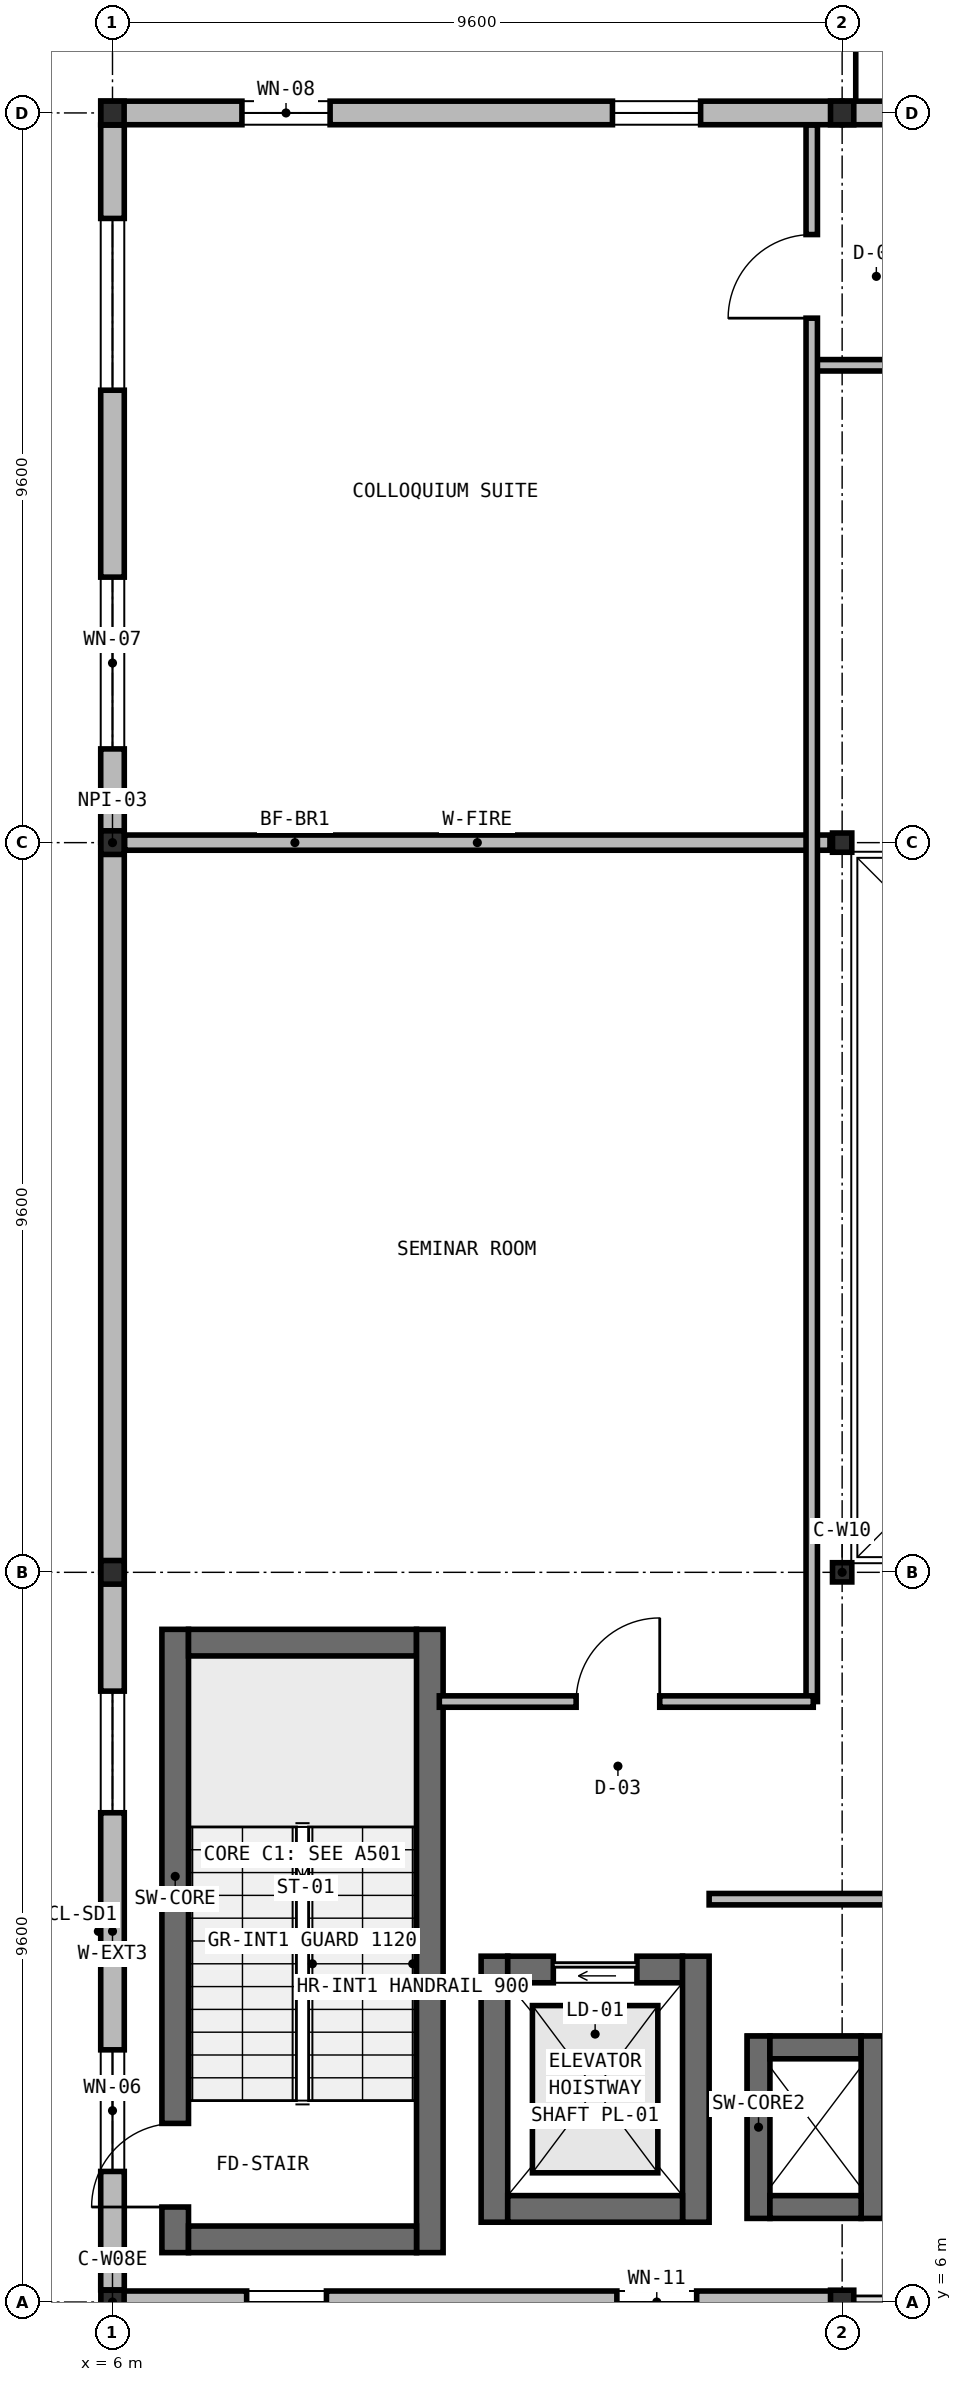
"""IFC4 building model, lengths in metres.
Left out: names, types, materials, properties, quantities, classifications, styles, units other than length and angle.
Written with IfcOpenShell. Run it as: python <this file> out.ifc"""

import sys

from ifc_helpers import new_model, si_unit, direction, frame, frame_2d, origin, origin_2d, place, context, subcontext, project, spatial, rectangle, i_section, extrude, element, fill, save


model = new_model("IFC4")
c1 = context("Model", 3, precision=1e-05, world=origin(), true_north=direction((0.0, 1.0)))
c2 = subcontext(c1, "Body", "Model", "MODEL_VIEW")
j1 = project(units=[si_unit("LENGTHUNIT", "METRE"), si_unit("PLANEANGLEUNIT", "RADIAN")], contexts=[c1])
p1 = place(None, origin())
s1 = spatial("IfcSite", under=j1, at=p1, CompositionType="ELEMENT")
p2 = place(p1, origin())
s2 = spatial("IfcBuilding", under=s1, at=p2, CompositionType="ELEMENT")
p3 = place(p2, frame((0.0, 0.0, 5.25)))
s3 = spatial("IfcBuildingStorey", under=s2, at=p3, CompositionType="ELEMENT", Elevation=5.25)
p4 = place(p3, frame((6.825, 6.65, 0.0), z_axis=(0.0, 0.0, 1.0), x_axis=(0.0, 1.0, 0.0)))
e1 = element("IfcWall", 1, at=p4, inside=s3, PredefinedType="SHEAR", context=c2, shape_type="SweptSolid", body=[
    extrude(rectangle(XDim=8.2, YDim=0.35, at=frame_2d((4.1, 0.0))), origin(), (0.0, 0.0, 1.0), 4.55),
])
p5 = place(p4, frame((0.6, 0.0, 0.0)))
e2 = element("IfcOpeningElement", 2, at=p5, cuts=e1, PredefinedType="OPENING", context=c2, shape_type="SweptSolid", body=[
    extrude(rectangle(XDim=1.1, YDim=2.15, at=frame_2d((0.55, 1.075))), frame((0.0, 0.185, 0.0), z_axis=(0.0, -1.0, 0.0), x_axis=(1.0, 0.0, 0.0)), (0.0, 0.0, 1.0), 0.37),
])
p6 = place(p3, frame((7.0, 14.675, 0.0), z_axis=(0.0, 0.0, 1.0), x_axis=(1.0, 0.0, 0.0)))
e3 = element("IfcWall", 3, at=p6, inside=s3, PredefinedType="SHEAR", context=c2, shape_type="SweptSolid", body=[
    extrude(rectangle(XDim=3.0, YDim=0.35, at=frame_2d((1.5, 0.0))), origin(), (0.0, 0.0, 1.0), 4.55),
])
p7 = place(p3, frame((10.175, 14.85, 0.0), z_axis=(0.0, 0.0, 1.0), x_axis=(0.0, -1.0, 0.0)))
e4 = element("IfcWall", 4, at=p7, inside=s3, PredefinedType="SHEAR", context=c2, shape_type="SweptSolid", body=[
    extrude(rectangle(XDim=8.2, YDim=0.35, at=frame_2d((4.1, 0.0))), origin(), (0.0, 0.0, 1.0), 4.55),
])
p8 = place(p3, frame((10.0, 6.825, 0.0), z_axis=(0.0, 0.0, 1.0), x_axis=(-1.0, 0.0, 0.0)))
e5 = element("IfcWall", 5, at=p8, inside=s3, PredefinedType="SHEAR", context=c2, shape_type="SweptSolid", body=[
    extrude(rectangle(XDim=3.0, YDim=0.35, at=frame_2d((1.5, 0.0))), origin(), (0.0, 0.0, 1.0), 4.55),
])
p9 = place(p3, frame((11.025, 7.05, 0.0), z_axis=(0.0, 0.0, 1.0), x_axis=(0.0, 1.0, 0.0)))
e6 = element("IfcWall", 6, at=p9, inside=s3, PredefinedType="SHEAR", context=c2, shape_type="SweptSolid", body=[
    extrude(rectangle(XDim=3.5, YDim=0.35, at=frame_2d((1.75, 0.0))), origin(), (0.0, 0.0, 1.0), 4.55),
])
p10 = place(p3, frame((11.2, 10.375, 0.0), z_axis=(0.0, 0.0, 1.0), x_axis=(1.0, 0.0, 0.0)))
e7 = element("IfcWall", 7, at=p10, inside=s3, PredefinedType="SHEAR", context=c2, shape_type="SweptSolid", body=[
    extrude(rectangle(XDim=2.3, YDim=0.35, at=frame_2d((1.15, 0.0))), origin(), (0.0, 0.0, 1.0), 4.55),
])
p11 = place(p10, frame((0.6, 0.0, 0.0)))
e8 = element("IfcOpeningElement", 8, at=p11, cuts=e7, PredefinedType="OPENING", context=c2, shape_type="SweptSolid", body=[
    extrude(rectangle(XDim=1.1, YDim=2.15, at=frame_2d((0.55, 1.075))), frame((0.0, 0.185, 0.0), z_axis=(0.0, -1.0, 0.0), x_axis=(1.0, 0.0, 0.0)), (0.0, 0.0, 1.0), 0.37),
])
p12 = place(p3, frame((13.675, 10.55, 0.0), z_axis=(0.0, 0.0, 1.0), x_axis=(0.0, -1.0, 0.0)))
e9 = element("IfcWall", 9, at=p12, inside=s3, PredefinedType="SHEAR", context=c2, shape_type="SweptSolid", body=[
    extrude(rectangle(XDim=3.5, YDim=0.35, at=frame_2d((1.75, 0.0))), origin(), (0.0, 0.0, 1.0), 4.55),
])
p13 = place(p3, frame((13.5, 7.225, 0.0), z_axis=(0.0, 0.0, 1.0), x_axis=(-1.0, 0.0, 0.0)))
e10 = element("IfcWall", 10, at=p13, inside=s3, PredefinedType="SHEAR", context=c2, shape_type="SweptSolid", body=[
    extrude(rectangle(XDim=2.3, YDim=0.35, at=frame_2d((1.15, 0.0))), origin(), (0.0, 0.0, 1.0), 4.55),
])
for number, where, z_axis, x_axis in (
    (11, (6.0, 6.0, 0.0), (0.0, 0.0, 1.0), (1.0, 0.0, 0.0)),
    (12, (6.0, 15.6, 0.0), (0.0, 0.0, 1.0), (1.0, 0.0, 0.0)),
    (13, (6.0, 25.2, 0.0), (0.0, 0.0, 1.0), (1.0, 0.0, 0.0)),
    (14, (6.0, 34.8, 0.0), (0.0, 0.0, 1.0), (1.0, 0.0, 0.0)),
    (15, (15.6, 6.0, 0.0), (0.0, 0.0, 1.0), (1.0, 0.0, 0.0)),
):
    element("IfcColumn", number, at=place(p3, frame(where, z_axis=z_axis, x_axis=x_axis)), inside=s3, PredefinedType="COLUMN", context=c2, shape_type="SweptSolid", body=[
        extrude(i_section(OverallWidth=0.306, OverallDepth=0.311, WebThickness=0.011, FlangeThickness=0.017, at=origin_2d()), origin(), (0.0, 0.0, 1.0), 4.55),
    ])
for number, where, z_axis, x_axis in (
    (16, (15.6, 15.6, 0.0), (0.0, 0.0, 1.0), (1.0, 0.0, 0.0)),
    (17, (15.6, 25.2, 0.0), (0.0, 0.0, 1.0), (1.0, 0.0, 0.0)),
):
    element("IfcColumn", number, at=place(p3, frame(where, z_axis=z_axis, x_axis=x_axis)), inside=s3, PredefinedType="COLUMN", context=c2, shape_type="SweptSolid", body=[
        extrude(i_section(OverallWidth=0.254, OverallDepth=0.253, WebThickness=0.009, FlangeThickness=0.014, at=origin_2d()), origin(), (0.0, 0.0, 1.0), 4.55),
    ])
p14 = place(p3, frame((15.6, 34.8, 0.0), z_axis=(0.0, 0.0, 1.0), x_axis=(1.0, 0.0, 0.0)))
e18 = element("IfcColumn", 18, at=p14, inside=s3, PredefinedType="COLUMN", context=c2, shape_type="SweptSolid", body=[
    extrude(i_section(OverallWidth=0.306, OverallDepth=0.311, WebThickness=0.011, FlangeThickness=0.017, at=origin_2d()), origin(), (0.0, 0.0, 1.0), 4.55),
])
p15 = place(p3, frame((14.5, 7.1, 0.0), z_axis=(0.0, 0.0, 1.0), x_axis=(0.0, 1.0, 0.0)))
e19 = element("IfcWall", 19, at=p15, inside=s3, PredefinedType="SHEAR", context=c2, shape_type="SweptSolid", body=[
    extrude(rectangle(XDim=2.4, YDim=0.3, at=frame_2d((1.2, 0.0))), origin(), (0.0, 0.0, 1.0), 4.37),
])
p16 = place(p3, frame((14.65, 9.35, 0.0), z_axis=(0.0, 0.0, 1.0), x_axis=(1.0, 0.0, 0.0)))
e20 = element("IfcWall", 20, at=p16, inside=s3, PredefinedType="SHEAR", context=c2, shape_type="SweptSolid", body=[
    extrude(rectangle(XDim=1.2, YDim=0.3, at=frame_2d((0.6, 0.0))), origin(), (0.0, 0.0, 1.0), 4.37),
])
p17 = place(p3, frame((16.0, 9.5, 0.0), z_axis=(0.0, 0.0, 1.0), x_axis=(0.0, -1.0, 0.0)))
e21 = element("IfcWall", 21, at=p17, inside=s3, PredefinedType="SHEAR", context=c2, shape_type="SweptSolid", body=[
    extrude(rectangle(XDim=2.4, YDim=0.3, at=frame_2d((1.2, 0.0))), origin(), (0.0, 0.0, 1.0), 4.37),
])
p18 = place(p3, frame((15.85, 7.25, 0.0), z_axis=(0.0, 0.0, 1.0), x_axis=(-1.0, 0.0, 0.0)))
e22 = element("IfcWall", 22, at=p18, inside=s3, PredefinedType="SHEAR", context=c2, shape_type="SweptSolid", body=[
    extrude(rectangle(XDim=1.2, YDim=0.3, at=frame_2d((0.6, 0.0))), origin(), (0.0, 0.0, 1.0), 4.37),
])
p19 = place(p3, frame((6.0, 6.159, 0.0), z_axis=(0.0, 0.0, 1.0), x_axis=(0.0, 1.0, 0.0)))
e23 = element("IfcWall", 23, at=p19, inside=s3, PredefinedType="SOLIDWALL", context=c2, shape_type="SweptSolid", body=[
    extrude(rectangle(XDim=9.437, YDim=0.31, at=frame_2d((4.719, 0.0))), origin(), (0.0, 0.0, 1.0), 3.884),
])
p20 = place(p19, frame((1.559, 0.0, 0.95)))
e24 = element("IfcOpeningElement", 24, at=p20, cuts=e23, PredefinedType="OPENING", context=c2, shape_type="SweptSolid", body=[
    extrude(rectangle(XDim=1.6, YDim=1.4, at=frame_2d((0.8, 0.7))), frame((0.0, 0.165, 0.0), z_axis=(0.0, -1.0, 0.0), x_axis=(1.0, 0.0, 0.0)), (0.0, 0.0, 1.0), 0.33),
])
p21 = place(p19, frame((6.278, 0.0, 0.95)))
e25 = element("IfcOpeningElement", 25, at=p21, cuts=e23, PredefinedType="OPENING", context=c2, shape_type="SweptSolid", body=[
    extrude(rectangle(XDim=1.6, YDim=1.4, at=frame_2d((0.8, 0.7))), frame((0.0, 0.165, 0.0), z_axis=(0.0, -1.0, 0.0), x_axis=(1.0, 0.0, 0.0)), (0.0, 0.0, 1.0), 0.33),
])
p22 = place(p3, frame((6.0, 15.604, 0.0), z_axis=(0.0, 0.0, 1.0), x_axis=(0.0, 1.0, 0.0)))
e26 = element("IfcWall", 26, at=p22, inside=s3, PredefinedType="SOLIDWALL", context=c2, shape_type="SweptSolid", body=[
    extrude(rectangle(XDim=9.592, YDim=0.31, at=frame_2d((4.796, 0.0))), origin(), (0.0, 0.0, 1.0), 3.884),
])
p23 = place(p3, frame((6.0, 25.204, 0.0), z_axis=(0.0, 0.0, 1.0), x_axis=(0.0, 1.0, 0.0)))
e27 = element("IfcWall", 27, at=p23, inside=s3, PredefinedType="SOLIDWALL", context=c2, shape_type="SweptSolid", body=[
    extrude(rectangle(XDim=9.437, YDim=0.31, at=frame_2d((4.719, 0.0))), origin(), (0.0, 0.0, 1.0), 3.884),
])
p24 = place(p23, frame((1.229, 0.0, 0.95)))
e28 = element("IfcOpeningElement", 28, at=p24, cuts=e27, PredefinedType="OPENING", context=c2, shape_type="SweptSolid", body=[
    extrude(rectangle(XDim=2.26, YDim=1.72, at=frame_2d((1.13, 0.86))), frame((0.0, 0.165, 0.0), z_axis=(0.0, -1.0, 0.0), x_axis=(1.0, 0.0, 0.0)), (0.0, 0.0, 1.0), 0.33),
])
p25 = place(p23, frame((5.948, 0.0, 0.95)))
e29 = element("IfcOpeningElement", 29, at=p25, cuts=e27, PredefinedType="OPENING", context=c2, shape_type="SweptSolid", body=[
    extrude(rectangle(XDim=2.26, YDim=1.72, at=frame_2d((1.13, 0.86))), frame((0.0, 0.165, 0.0), z_axis=(0.0, -1.0, 0.0), x_axis=(1.0, 0.0, 0.0)), (0.0, 0.0, 1.0), 0.33),
])
p26 = place(p3, frame((5.845, 34.8, 0.0), z_axis=(0.0, 0.0, 1.0), x_axis=(1.0, 0.0, 0.0)))
e30 = element("IfcWall", 30, at=p26, inside=s3, PredefinedType="SOLIDWALL", context=c2, shape_type="SweptSolid", body=[
    extrude(rectangle(XDim=9.751, YDim=0.31, at=frame_2d((4.875, 0.0))), origin(), (0.0, 0.0, 1.0), 3.884),
])
p27 = place(p26, frame((1.858, 0.0, 0.95)))
e31 = element("IfcOpeningElement", 31, at=p27, cuts=e30, PredefinedType="OPENING", context=c2, shape_type="SweptSolid", body=[
    extrude(rectangle(XDim=1.16, YDim=1.56, at=frame_2d((0.58, 0.78))), frame((0.0, 0.165, 0.0), z_axis=(0.0, -1.0, 0.0), x_axis=(1.0, 0.0, 0.0)), (0.0, 0.0, 1.0), 0.33),
])
p28 = place(p26, frame((6.733, 0.0, 0.95)))
e32 = element("IfcOpeningElement", 32, at=p28, cuts=e30, PredefinedType="OPENING", context=c2, shape_type="SweptSolid", body=[
    extrude(rectangle(XDim=1.16, YDim=1.56, at=frame_2d((0.58, 0.78))), frame((0.0, 0.165, 0.0), z_axis=(0.0, -1.0, 0.0), x_axis=(1.0, 0.0, 0.0)), (0.0, 0.0, 1.0), 0.33),
])
p29 = place(p3, frame((15.604, 34.8, 0.0), z_axis=(0.0, 0.0, 1.0), x_axis=(1.0, 0.0, 0.0)))
e33 = element("IfcWall", 33, at=p29, inside=s3, PredefinedType="SOLIDWALL", context=c2, shape_type="SweptSolid", body=[
    extrude(rectangle(XDim=9.592, YDim=0.31, at=frame_2d((4.796, 0.0))), origin(), (0.0, 0.0, 1.0), 3.884),
])
p30 = place(p3, frame((15.596, 6.0, 0.0), z_axis=(0.0, 0.0, 1.0), x_axis=(-1.0, 0.0, 0.0)))
e34 = element("IfcWall", 34, at=p30, inside=s3, PredefinedType="SOLIDWALL", context=c2, shape_type="SweptSolid", body=[
    extrude(rectangle(XDim=9.741, YDim=0.29, at=frame_2d((4.871, 0.0))), origin(), (0.0, 0.0, 1.0), 3.884),
])
p31 = place(p30, frame((1.91, 0.0, 0.95)))
e35 = element("IfcOpeningElement", 35, at=p31, cuts=e34, PredefinedType="OPENING", context=c2, shape_type="SweptSolid", body=[
    extrude(rectangle(XDim=1.05, YDim=1.64, at=frame_2d((0.525, 0.82))), frame((0.0, 0.155, 0.0), z_axis=(0.0, -1.0, 0.0), x_axis=(1.0, 0.0, 0.0)), (0.0, 0.0, 1.0), 0.31),
])
p32 = place(p30, frame((6.781, 0.0, 0.95)))
e36 = element("IfcOpeningElement", 36, at=p32, cuts=e34, PredefinedType="OPENING", context=c2, shape_type="SweptSolid", body=[
    extrude(rectangle(XDim=1.05, YDim=1.64, at=frame_2d((0.525, 0.82))), frame((0.0, 0.155, 0.0), z_axis=(0.0, -1.0, 0.0), x_axis=(1.0, 0.0, 0.0)), (0.0, 0.0, 1.0), 0.31),
])
p33 = place(p3, frame((6.16, 25.2, 0.0), z_axis=(0.0, 0.0, 1.0), x_axis=(1.0, 0.0, 0.0)))
e37 = element("IfcWall", 37, at=p33, inside=s3, PredefinedType="SOLIDWALL", context=c2, shape_type="SweptSolid", body=[
    extrude(rectangle(XDim=9.28, YDim=0.2, at=frame_2d((4.64, 0.0))), origin(), (0.0, 0.0, 1.0), 3.815),
])
p34 = place(p3, frame((13.85, 11.3, 0.0), z_axis=(0.0, 0.0, 1.0), x_axis=(1.0, 0.0, 0.0)))
e38 = element("IfcWall", 38, at=p34, inside=s3, PredefinedType="PARTITIONING", context=c2, shape_type="SweptSolid", body=[
    extrude(rectangle(XDim=13.67, YDim=0.15, at=frame_2d((6.835, 0.0))), origin(), (0.0, 0.0, 1.0), 4.23),
])
p35 = place(p34, frame((4.2, 0.0, 0.0)))
e39 = element("IfcOpeningElement", 39, at=p35, cuts=e38, PredefinedType="OPENING", context=c2, shape_type="SweptSolid", body=[
    extrude(rectangle(XDim=1.2, YDim=2.2, at=frame_2d((0.6, 1.1))), frame((0.0, 0.085, 0.0), z_axis=(0.0, -1.0, 0.0), x_axis=(1.0, 0.0, 0.0)), (0.0, 0.0, 1.0), 0.17),
])
p36 = place(p3, frame((15.2, 31.48, 0.0), z_axis=(0.0, 0.0, 1.0), x_axis=(1.0, 0.0, 0.0)))
e40 = element("IfcWall", 40, at=p36, inside=s3, PredefinedType="PARTITIONING", context=c2, shape_type="SweptSolid", body=[
    extrude(rectangle(XDim=12.32, YDim=0.15, at=frame_2d((6.16, 0.0))), origin(), (0.0, 0.0, 1.0), 4.23),
])
p37 = place(p3, frame((15.2, 13.9, 0.0), z_axis=(0.0, 0.0, 1.0), x_axis=(0.0, 1.0, 0.0)))
e41 = element("IfcWall", 41, at=p37, inside=s3, PredefinedType="PARTITIONING", context=c2, shape_type="SweptSolid", body=[
    extrude(rectangle(XDim=20.74, YDim=0.15, at=frame_2d((10.37, 0.0))), origin(), (0.0, 0.0, 1.0), 4.23),
])
p38 = place(p37, frame((18.2, 0.0, 0.0)))
e42 = element("IfcOpeningElement", 42, at=p38, cuts=e41, PredefinedType="OPENING", context=c2, shape_type="SweptSolid", body=[
    extrude(rectangle(XDim=1.1, YDim=2.2, at=frame_2d((0.55, 1.1))), frame((0.0, 0.085, 0.0), z_axis=(0.0, -1.0, 0.0), x_axis=(1.0, 0.0, 0.0)), (0.0, 0.0, 1.0), 0.17),
])
p39 = place(p3, frame((10.3, 13.9, 0.0), z_axis=(0.0, 0.0, 1.0), x_axis=(1.0, 0.0, 0.0)))
e43 = element("IfcWall", 43, at=p39, inside=s3, PredefinedType="PARTITIONING", context=c2, shape_type="SweptSolid", body=[
    extrude(rectangle(XDim=4.92, YDim=0.15, at=frame_2d((2.46, 0.0))), origin(), (0.0, 0.0, 1.0), 4.23),
])
p40 = place(p39, frame((1.8, 0.0, 0.0)))
e44 = element("IfcOpeningElement", 44, at=p40, cuts=e43, PredefinedType="OPENING", context=c2, shape_type="SweptSolid", body=[
    extrude(rectangle(XDim=1.1, YDim=2.2, at=frame_2d((0.55, 1.1))), frame((0.0, 0.085, 0.0), z_axis=(0.0, -1.0, 0.0), x_axis=(1.0, 0.0, 0.0)), (0.0, 0.0, 1.0), 0.17),
])
p41 = place(p20, origin())
e45 = element("IfcWindow", 45, at=p41, inside=s3, PartitioningType="SINGLE_PANEL", PredefinedType="WINDOW", context=c2, shape_type="SweptSolid", body=[
    extrude(rectangle(XDim=1.6, YDim=1.4, at=frame_2d((0.8, 0.7))), frame((0.0, 0.03, 0.0), z_axis=(0.0, -1.0, 0.0), x_axis=(1.0, 0.0, 0.0)), (0.0, 0.0, 1.0), 0.06),
])
fill(e24, e45)
p42 = place(p21, origin())
e46 = element("IfcWindow", 46, at=p42, inside=s3, PartitioningType="SINGLE_PANEL", PredefinedType="WINDOW", context=c2, shape_type="SweptSolid", body=[
    extrude(rectangle(XDim=1.6, YDim=1.4, at=frame_2d((0.8, 0.7))), frame((0.0, 0.03, 0.0), z_axis=(0.0, -1.0, 0.0), x_axis=(1.0, 0.0, 0.0)), (0.0, 0.0, 1.0), 0.06),
])
fill(e25, e46)
p43 = place(p24, origin())
e47 = element("IfcWindow", 47, at=p43, inside=s3, PartitioningType="SINGLE_PANEL", PredefinedType="WINDOW", context=c2, shape_type="SweptSolid", body=[
    extrude(rectangle(XDim=2.26, YDim=1.72, at=frame_2d((1.13, 0.86))), frame((0.0, 0.03, 0.0), z_axis=(0.0, -1.0, 0.0), x_axis=(1.0, 0.0, 0.0)), (0.0, 0.0, 1.0), 0.06),
])
fill(e28, e47)
p44 = place(p25, origin())
e48 = element("IfcWindow", 48, at=p44, inside=s3, PartitioningType="SINGLE_PANEL", PredefinedType="WINDOW", context=c2, shape_type="SweptSolid", body=[
    extrude(rectangle(XDim=2.26, YDim=1.72, at=frame_2d((1.13, 0.86))), frame((0.0, 0.03, 0.0), z_axis=(0.0, -1.0, 0.0), x_axis=(1.0, 0.0, 0.0)), (0.0, 0.0, 1.0), 0.06),
])
fill(e29, e48)
p45 = place(p27, origin())
e49 = element("IfcWindow", 49, at=p45, inside=s3, PartitioningType="SINGLE_PANEL", PredefinedType="WINDOW", context=c2, shape_type="SweptSolid", body=[
    extrude(rectangle(XDim=1.16, YDim=1.56, at=frame_2d((0.58, 0.78))), frame((0.0, 0.03, 0.0), z_axis=(0.0, -1.0, 0.0), x_axis=(1.0, 0.0, 0.0)), (0.0, 0.0, 1.0), 0.06),
])
fill(e31, e49)
p46 = place(p28, origin())
e50 = element("IfcWindow", 50, at=p46, inside=s3, PartitioningType="SINGLE_PANEL", PredefinedType="WINDOW", context=c2, shape_type="SweptSolid", body=[
    extrude(rectangle(XDim=1.16, YDim=1.56, at=frame_2d((0.58, 0.78))), frame((0.0, 0.03, 0.0), z_axis=(0.0, -1.0, 0.0), x_axis=(1.0, 0.0, 0.0)), (0.0, 0.0, 1.0), 0.06),
])
fill(e32, e50)
p47 = place(p31, origin())
e51 = element("IfcWindow", 51, at=p47, inside=s3, PartitioningType="SINGLE_PANEL", PredefinedType="WINDOW", context=c2, shape_type="SweptSolid", body=[
    extrude(rectangle(XDim=1.05, YDim=1.64, at=frame_2d((0.525, 0.82))), frame((0.0, 0.03, 0.0), z_axis=(0.0, -1.0, 0.0), x_axis=(1.0, 0.0, 0.0)), (0.0, 0.0, 1.0), 0.06),
])
fill(e35, e51)
p48 = place(p32, origin())
e52 = element("IfcWindow", 52, at=p48, inside=s3, PartitioningType="SINGLE_PANEL", PredefinedType="WINDOW", context=c2, shape_type="SweptSolid", body=[
    extrude(rectangle(XDim=1.05, YDim=1.64, at=frame_2d((0.525, 0.82))), frame((0.0, 0.03, 0.0), z_axis=(0.0, -1.0, 0.0), x_axis=(1.0, 0.0, 0.0)), (0.0, 0.0, 1.0), 0.06),
])
fill(e36, e52)
p49 = place(p5, origin())
e53 = element("IfcDoor", 53, at=p49, inside=s3, OperationType="SINGLE_SWING_LEFT", PredefinedType="DOOR", context=c2, shape_type="SweptSolid", body=[
    extrude(rectangle(XDim=1.1, YDim=2.15, at=frame_2d((0.55, 1.075))), frame((0.0, 0.025, 0.0), z_axis=(0.0, -1.0, 0.0), x_axis=(1.0, 0.0, 0.0)), (0.0, 0.0, 1.0), 0.05),
])
fill(e2, e53)
p50 = place(p11, origin())
e54 = element("IfcDoor", 54, at=p50, inside=s3, OperationType="SLIDING_TO_LEFT", PredefinedType="USERDEFINED", context=c2, shape_type="SweptSolid", body=[
    extrude(rectangle(XDim=1.1, YDim=2.15, at=frame_2d((0.55, 1.075))), frame((0.0, 0.025, 0.0), z_axis=(0.0, -1.0, 0.0), x_axis=(1.0, 0.0, 0.0)), (0.0, 0.0, 1.0), 0.05),
])
fill(e8, e54)
p51 = place(p38, origin())
e55 = element("IfcDoor", 55, at=p51, inside=s3, OperationType="SINGLE_SWING_LEFT", PredefinedType="DOOR", context=c2, shape_type="SweptSolid", body=[
    extrude(rectangle(XDim=1.1, YDim=2.2, at=frame_2d((0.55, 1.1))), frame((0.0, 0.025, 0.0), z_axis=(0.0, -1.0, 0.0), x_axis=(1.0, 0.0, 0.0)), (0.0, 0.0, 1.0), 0.05),
])
fill(e42, e55)
p52 = place(p40, origin())
e56 = element("IfcDoor", 56, at=p52, inside=s3, OperationType="SINGLE_SWING_RIGHT", PredefinedType="DOOR", context=c2, shape_type="SweptSolid", body=[
    extrude(rectangle(XDim=1.1, YDim=2.2, at=frame_2d((0.55, 1.1))), frame((0.0, 0.025, 0.0), z_axis=(0.0, -1.0, 0.0), x_axis=(1.0, 0.0, 0.0)), (0.0, 0.0, 1.0), 0.05),
])
fill(e44, e56)
save(model, sys.argv[1])
